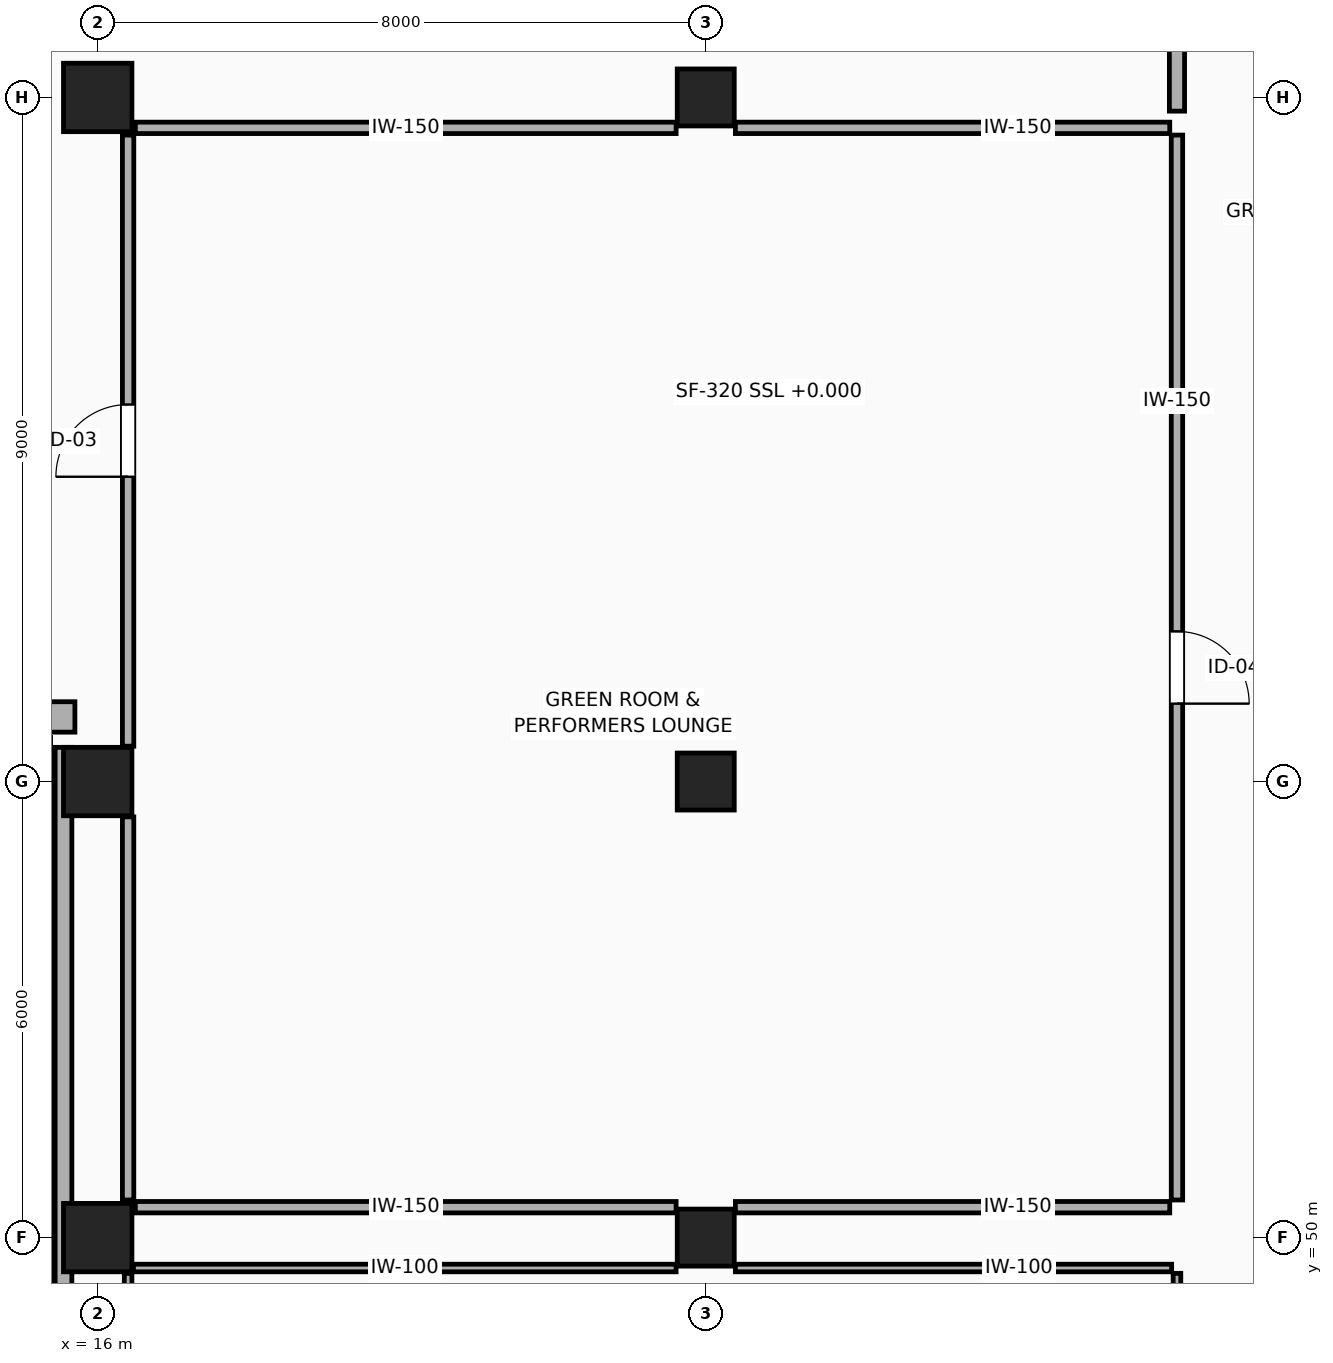
"""IFC4 building model, lengths in metres.
Left out: names, types, materials, properties, quantities, classifications, styles, units other than length and angle.
Written with IfcOpenShell. Run it as: python <this file> out.ifc"""

import sys

from ifc_helpers import new_model, si_unit, direction, frame, frame_2d, origin, origin_2d, place, context, subcontext, project, spatial, rectangle, extrude, element, fill, save


model = new_model("IFC4")
c1 = context("Model", 3, precision=1e-05, world=origin(), true_north=direction((0.0, 1.0)))
c2 = subcontext(c1, "Body", "Model", "MODEL_VIEW")
j1 = project(units=[si_unit("LENGTHUNIT", "METRE"), si_unit("PLANEANGLEUNIT", "RADIAN")], contexts=[c1])
p1 = place(None, origin())
s1 = spatial("IfcSite", under=j1, at=p1, CompositionType="ELEMENT")
p2 = place(p1, origin())
s2 = spatial("IfcBuilding", under=s1, at=p2, CompositionType="ELEMENT")
p3 = place(p2, origin())
s3 = spatial("IfcBuildingStorey", under=s2, at=p3, CompositionType="ELEMENT", Elevation=0.0)
for number, where, z_axis, x_axis in (
    (1, (16.0, 50.0, 0.0), (0.0, 0.0, 1.0), (1.0, 0.0, 0.0)),
    (2, (16.0, 56.0, 0.0), (0.0, 0.0, 1.0), (1.0, 0.0, 0.0)),
    (3, (16.0, 65.0, 0.0), (0.0, 0.0, 1.0), (1.0, 0.0, 0.0)),
):
    element("IfcColumn", number, at=place(p3, frame(where, z_axis=z_axis, x_axis=x_axis)), inside=s3, PredefinedType="COLUMN", context=c2, shape_type="SweptSolid", body=[
        extrude(rectangle(XDim=0.9, YDim=0.9, at=origin_2d()), origin(), (0.0, 0.0, 1.0), 5.4),
    ])
for number, where, z_axis, x_axis in (
    (4, (24.0, 50.0, 0.0), (0.0, 0.0, 1.0), (1.0, 0.0, 0.0)),
    (5, (24.0, 56.0, 0.0), (0.0, 0.0, 1.0), (1.0, 0.0, 0.0)),
    (6, (24.0, 65.0, 0.0), (0.0, 0.0, 1.0), (1.0, 0.0, 0.0)),
):
    element("IfcColumn", number, at=place(p3, frame(where, z_axis=z_axis, x_axis=x_axis)), inside=s3, PredefinedType="COLUMN", context=c2, shape_type="SweptSolid", body=[
        extrude(rectangle(XDim=0.75, YDim=0.75, at=origin_2d()), origin(), (0.0, 0.0, 1.0), 5.4),
    ])
p4 = place(p3, frame((9.1, 56.85, 0.0), z_axis=(0.0, 0.0, 1.0), x_axis=(1.0, 0.0, 0.0)))
e7 = element("IfcWall", 7, at=p4, inside=s3, PredefinedType="STANDARD", context=c2, shape_type="SweptSolid", body=[
    extrude(rectangle(XDim=6.6, YDim=0.4, at=frame_2d((3.3, 0.0))), origin(), (0.0, 0.0, 1.0), 4.85),
])
p5 = place(p4, frame((0.7, 0.0, 0.0)))
e8 = element("IfcOpeningElement", 8, at=p5, cuts=e7, PredefinedType="OPENING", context=c2, shape_type="SweptSolid", body=[
    extrude(rectangle(XDim=5.2, YDim=3.6, at=frame_2d((2.6, 1.8))), frame((0.0, 0.21, 0.0), z_axis=(0.0, -1.0, 0.0), x_axis=(1.0, 0.0, 0.0)), (0.0, 0.0, 1.0), 0.42),
])
p6 = place(p3, frame((15.55, 18.25, 0.0), z_axis=(0.0, 0.0, 1.0), x_axis=(0.0, 1.0, 0.0)))
e9 = element("IfcWall", 9, at=p6, inside=s3, PredefinedType="PARAPET", context=c2, shape_type="SweptSolid", body=[
    extrude(rectangle(XDim=38.2, YDim=0.22, at=frame_2d((19.1, 0.0))), origin(), (0.0, 0.0, 1.0), 1.25),
])
p7 = place(p3, frame((16.495, 64.6, 0.0), z_axis=(0.0, 0.0, 1.0), x_axis=(1.0, 0.0, 0.0)))
e10 = element("IfcWall", 10, at=p7, inside=s3, PredefinedType="PARTITIONING", context=c2, shape_type="SweptSolid", body=[
    extrude(rectangle(XDim=7.115, YDim=0.15, at=frame_2d((3.558, 0.0))), origin(), (0.0, 0.0, 1.0), 4.25),
])
p8 = place(p3, frame((24.39, 64.6, 0.0), z_axis=(0.0, 0.0, 1.0), x_axis=(1.0, 0.0, 0.0)))
e11 = element("IfcWall", 11, at=p8, inside=s3, PredefinedType="PARTITIONING", context=c2, shape_type="SweptSolid", body=[
    extrude(rectangle(XDim=5.715, YDim=0.15, at=frame_2d((2.857, 0.0))), origin(), (0.0, 0.0, 1.0), 4.35),
])
p9 = place(p3, frame((30.2, 64.505, 0.0), z_axis=(0.0, 0.0, 1.0), x_axis=(0.0, -1.0, 0.0)))
e12 = element("IfcWall", 12, at=p9, inside=s3, PredefinedType="PARTITIONING", context=c2, shape_type="SweptSolid", body=[
    extrude(rectangle(XDim=14.01, YDim=0.15, at=frame_2d((7.005, 0.0))), origin(), (0.0, 0.0, 1.0), 5.11),
])
p10 = place(p9, frame((6.53, 0.0, 0.0)))
e13 = element("IfcOpeningElement", 13, at=p10, cuts=e12, PredefinedType="OPENING", context=c2, shape_type="SweptSolid", body=[
    extrude(rectangle(XDim=0.95, YDim=2.15, at=frame_2d((0.475, 1.075))), frame((0.0, 0.085, 0.0), z_axis=(0.0, -1.0, 0.0), x_axis=(1.0, 0.0, 0.0)), (0.0, 0.0, 1.0), 0.17),
])
p11 = place(p3, frame((30.105, 50.4, 0.0), z_axis=(0.0, 0.0, 1.0), x_axis=(-1.0, 0.0, 0.0)))
e14 = element("IfcWall", 14, at=p11, inside=s3, PredefinedType="PARTITIONING", context=c2, shape_type="SweptSolid", body=[
    extrude(rectangle(XDim=5.715, YDim=0.15, at=frame_2d((2.857, 0.0))), origin(), (0.0, 0.0, 1.0), 4.1),
])
p12 = place(p3, frame((23.61, 50.4, 0.0), z_axis=(0.0, 0.0, 1.0), x_axis=(-1.0, 0.0, 0.0)))
e15 = element("IfcWall", 15, at=p12, inside=s3, PredefinedType="PARTITIONING", context=c2, shape_type="SweptSolid", body=[
    extrude(rectangle(XDim=7.115, YDim=0.15, at=frame_2d((3.558, 0.0))), origin(), (0.0, 0.0, 1.0), 5.11),
])
p13 = place(p3, frame((16.4, 50.495, 0.0), z_axis=(0.0, 0.0, 1.0), x_axis=(0.0, 1.0, 0.0)))
e16 = element("IfcWall", 16, at=p13, inside=s3, PredefinedType="PARTITIONING", context=c2, shape_type="SweptSolid", body=[
    extrude(rectangle(XDim=5.04, YDim=0.15, at=frame_2d((2.52, 0.0))), origin(), (0.0, 0.0, 1.0), 5.11),
])
p14 = place(p3, frame((16.4, 56.465, 0.0), z_axis=(0.0, 0.0, 1.0), x_axis=(0.0, 1.0, 0.0)))
e17 = element("IfcWall", 17, at=p14, inside=s3, PredefinedType="PARTITIONING", context=c2, shape_type="SweptSolid", body=[
    extrude(rectangle(XDim=8.04, YDim=0.15, at=frame_2d((4.02, 0.0))), origin(), (0.0, 0.0, 1.0), 5.4),
])
p15 = place(p14, frame((3.545, 0.0, 0.0)))
e18 = element("IfcOpeningElement", 18, at=p15, cuts=e17, PredefinedType="OPENING", context=c2, shape_type="SweptSolid", body=[
    extrude(rectangle(XDim=0.95, YDim=2.15, at=frame_2d((0.475, 1.075))), frame((0.0, 0.085, 0.0), z_axis=(0.0, -1.0, 0.0), x_axis=(1.0, 0.0, 0.0)), (0.0, 0.0, 1.0), 0.17),
])
p16 = place(p3, frame((30.2, 73.48, 0.0), z_axis=(0.0, 0.0, 1.0), x_axis=(0.0, -1.0, 0.0)))
e19 = element("IfcWall", 19, at=p16, inside=s3, PredefinedType="PARTITIONING", context=c2, shape_type="SweptSolid", body=[
    extrude(rectangle(XDim=8.66, YDim=0.2, at=frame_2d((4.33, 0.0))), origin(), (0.0, 0.0, 1.0), 5.11),
])
p17 = place(p16, frame((3.805, 0.0, 0.0)))
e20 = element("IfcOpeningElement", 20, at=p17, cuts=e19, PredefinedType="OPENING", context=c2, shape_type="SweptSolid", body=[
    extrude(rectangle(XDim=1.05, YDim=2.15, at=frame_2d((0.525, 1.075))), frame((0.0, 0.11, 0.0), z_axis=(0.0, -1.0, 0.0), x_axis=(1.0, 0.0, 0.0)), (0.0, 0.0, 1.0), 0.22),
])
p18 = place(p3, frame((16.47, 49.6, 0.0), z_axis=(0.0, 0.0, 1.0), x_axis=(1.0, 0.0, 0.0)))
e21 = element("IfcWall", 21, at=p18, inside=s3, PredefinedType="PARTITIONING", context=c2, shape_type="SweptSolid", body=[
    extrude(rectangle(XDim=7.14, YDim=0.1, at=frame_2d((3.57, 0.0))), origin(), (0.0, 0.0, 1.0), 5.11),
])
p19 = place(p3, frame((24.39, 49.6, 0.0), z_axis=(0.0, 0.0, 1.0), x_axis=(1.0, 0.0, 0.0)))
e22 = element("IfcWall", 22, at=p19, inside=s3, PredefinedType="PARTITIONING", context=c2, shape_type="SweptSolid", body=[
    extrude(rectangle(XDim=5.74, YDim=0.1, at=frame_2d((2.87, 0.0))), origin(), (0.0, 0.0, 1.0), 4.1),
])
p20 = place(p3, frame((30.2, 49.53, 0.0), z_axis=(0.0, 0.0, 1.0), x_axis=(0.0, -1.0, 0.0)))
e23 = element("IfcWall", 23, at=p20, inside=s3, PredefinedType="PARTITIONING", context=c2, shape_type="SweptSolid", body=[
    extrude(rectangle(XDim=8.26, YDim=0.1, at=frame_2d((4.13, 0.0))), origin(), (0.0, 0.0, 1.0), 5.11),
])
p21 = place(p20, frame((3.605, 0.0, 0.0)))
e24 = element("IfcOpeningElement", 24, at=p21, cuts=e23, PredefinedType="OPENING", context=c2, shape_type="SweptSolid", body=[
    extrude(rectangle(XDim=1.05, YDim=2.15, at=frame_2d((0.525, 1.075))), frame((0.0, 0.06, 0.0), z_axis=(0.0, -1.0, 0.0), x_axis=(1.0, 0.0, 0.0)), (0.0, 0.0, 1.0), 0.12),
])
p22 = place(p3, frame((16.4, 41.465, 0.0), z_axis=(0.0, 0.0, 1.0), x_axis=(0.0, 1.0, 0.0)))
e25 = element("IfcWall", 25, at=p22, inside=s3, PredefinedType="PARTITIONING", context=c2, shape_type="SweptSolid", body=[
    extrude(rectangle(XDim=8.065, YDim=0.1, at=frame_2d((4.032, 0.0))), origin(), (0.0, 0.0, 1.0), 5.11),
])
p23 = place(p10, origin())
e26 = element("IfcDoor", 26, at=p23, inside=s3, OperationType="SINGLE_SWING_RIGHT", PredefinedType="DOOR", context=c2, shape_type="SweptSolid", body=[
    extrude(rectangle(XDim=0.95, YDim=2.15, at=frame_2d((0.475, 1.075))), frame((0.0, 0.025, 0.0), z_axis=(0.0, -1.0, 0.0), x_axis=(1.0, 0.0, 0.0)), (0.0, 0.0, 1.0), 0.05),
])
fill(e13, e26)
p24 = place(p15, origin())
e27 = element("IfcDoor", 27, at=p24, inside=s3, OperationType="SINGLE_SWING_LEFT", PredefinedType="DOOR", context=c2, shape_type="SweptSolid", body=[
    extrude(rectangle(XDim=0.95, YDim=2.15, at=frame_2d((0.475, 1.075))), frame((0.0, 0.025, 0.0), z_axis=(0.0, -1.0, 0.0), x_axis=(1.0, 0.0, 0.0)), (0.0, 0.0, 1.0), 0.05),
])
fill(e18, e27)
save(model, sys.argv[1])
